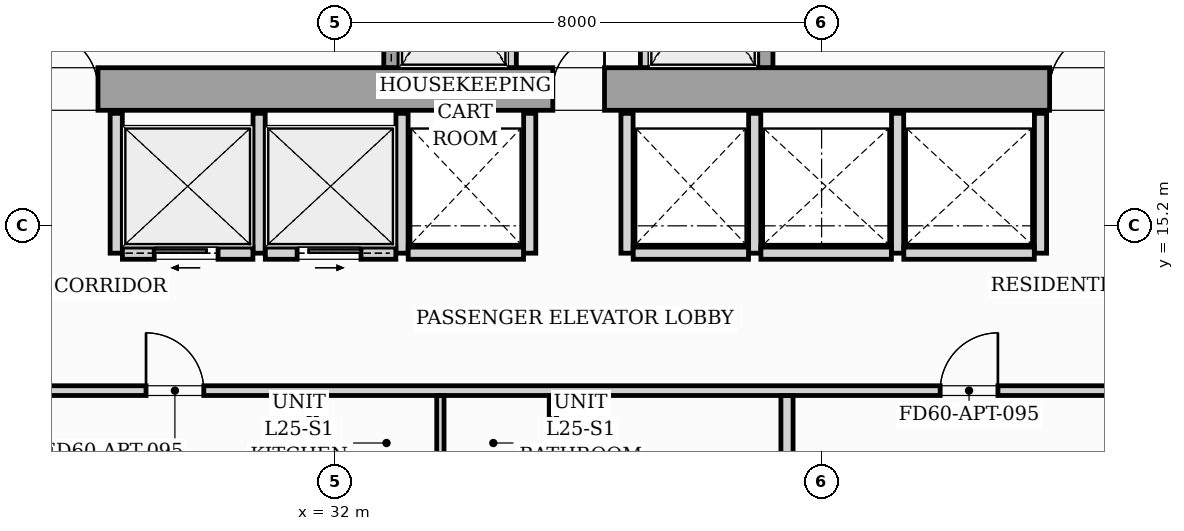
"""IFC4 building model, lengths in metres.
Left out: names, types, materials, properties, quantities, classifications, styles, units other than length and angle.
Written with IfcOpenShell. Run it as: python <this file> out.ifc"""

import sys

from ifc_helpers import new_model, si_unit, direction, frame, frame_2d, origin, origin_2d, place, context, subcontext, project, spatial, rectangle, i_section, extrude, source, transform, mapped, element, fill, save


model = new_model("IFC4")
c1 = context("Model", 3, precision=1e-05, world=origin(), true_north=direction((0.0, 1.0)))
c2 = subcontext(c1, "Body", "Model", "MODEL_VIEW")
j1 = project(units=[si_unit("LENGTHUNIT", "METRE"), si_unit("PLANEANGLEUNIT", "RADIAN")], contexts=[c1])
p1 = place(None, origin())
s1 = spatial("IfcSite", under=j1, at=p1, CompositionType="ELEMENT")
p2 = place(p1, origin())
s2 = spatial("IfcBuilding", under=s1, at=p2, CompositionType="ELEMENT")
p3 = place(p2, frame((0.0, 0.0, 90.6)))
s3 = spatial("IfcBuildingStorey", under=s2, at=p3, CompositionType="ELEMENT", Elevation=90.6)
m1 = source(origin(), c2, "Body", "SweptSolid", [
    extrude(i_section(OverallWidth=0.427, OverallDepth=0.483, WebThickness=0.051, FlangeThickness=0.082, FilletRadius=0.018, at=origin_2d()), origin(), (0.0, 0.0, 1.0), 3.196),
])
for number, where, z_axis, x_axis in (
    (1, (33.12, 17.4, 0.002), (0.0, 0.0, 1.0), (1.0, 0.0, 0.0)),
    (2, (38.88, 17.4, 0.002), (0.0, 0.0, 1.0), (1.0, 0.0, 0.0)),
):
    element("IfcColumn", number, at=place(p3, frame(where, z_axis=z_axis, x_axis=x_axis)), inside=s3, PredefinedType="PILASTER", context=c2, shape_type="MappedRepresentation", body=[
        mapped(m1, transform((0.0, 0.0, 0.0), scale=1.0)),
    ])
p4 = place(p3, frame((26.1, 17.45, 0.0), z_axis=(0.0, 0.0, 1.0), x_axis=(1.0, 0.0, 0.0)))
e3 = element("IfcWall", 3, at=p4, inside=s3, PredefinedType="SHEAR", context=c2, shape_type="SweptSolid", body=[
    extrude(rectangle(XDim=19.8, YDim=0.7, at=frame_2d((9.9, 0.0))), origin(), (0.0, 0.0, 1.0), 3.2),
])
p5 = place(p4, frame((1.05, 0.0, 0.0)))
e4 = element("IfcOpeningElement", 4, at=p5, cuts=e3, PredefinedType="OPENING", context=c2, shape_type="SweptSolid", body=[
    extrude(rectangle(XDim=0.95, YDim=2.06, at=frame_2d((0.475, 1.03))), frame((0.0, 0.36, 0.0), z_axis=(0.0, -1.0, 0.0), x_axis=(1.0, 0.0, 0.0)), (0.0, 0.0, 1.0), 0.72),
])
p6 = place(p4, frame((9.48, 0.0, 0.0)))
e5 = element("IfcOpeningElement", 5, at=p6, cuts=e3, PredefinedType="OPENING", context=c2, shape_type="SweptSolid", body=[
    extrude(rectangle(XDim=0.85, YDim=2.0, at=frame_2d((0.425, 1.0))), frame((0.0, 0.36, 0.0), z_axis=(0.0, -1.0, 0.0), x_axis=(1.0, 0.0, 0.0)), (0.0, 0.0, 1.0), 0.72),
])
p7 = place(p4, frame((17.65, 0.0, 0.0)))
e6 = element("IfcOpeningElement", 6, at=p7, cuts=e3, PredefinedType="OPENING", context=c2, shape_type="SweptSolid", body=[
    extrude(rectangle(XDim=0.95, YDim=2.06, at=frame_2d((0.475, 1.03))), frame((0.0, 0.36, 0.0), z_axis=(0.0, -1.0, 0.0), x_axis=(1.0, 0.0, 0.0)), (0.0, 0.0, 1.0), 0.72),
])
p8 = place(p3, frame((32.925, 17.802, 0.0), z_axis=(0.0, 0.0, 1.0), x_axis=(0.0, 1.0, 0.0)))
e7 = element("IfcWall", 7, at=p8, inside=s3, PredefinedType="SOLIDWALL", context=c2, shape_type="SweptSolid", body=[
    extrude(rectangle(XDim=2.646, YDim=0.25, at=frame_2d((1.323, 0.0))), origin(), (0.0, 0.0, 1.0), 3.2),
])
p9 = place(p8, frame((0.598, 0.0, 0.0)))
e8 = element("IfcOpeningElement", 8, at=p9, cuts=e7, PredefinedType="OPENING", context=c2, shape_type="SweptSolid", body=[
    extrude(rectangle(XDim=1.1, YDim=2.08, at=frame_2d((0.55, 1.04))), frame((0.0, 0.135, 0.0), z_axis=(0.0, -1.0, 0.0), x_axis=(1.0, 0.0, 0.0)), (0.0, 0.0, 1.0), 0.27),
])
for number, where, z_axis, x_axis in (
    (9, (34.9, 17.802, 0.0), (0.0, 0.0, 1.0), (0.0, 1.0, 0.0)),
    (10, (37.1, 17.802, 0.0), (0.0, 0.0, 1.0), (0.0, 1.0, 0.0)),
):
    element("IfcWall", number, at=place(p3, frame(where, z_axis=z_axis, x_axis=x_axis)), inside=s3, PredefinedType="PARTITIONING", context=c2, shape_type="SweptSolid", body=[
        extrude(rectangle(XDim=2.646, YDim=0.16, at=frame_2d((1.323, 0.0))), origin(), (0.0, 0.0, 1.0), 2.94),
    ])
p10 = place(p3, frame((39.075, 17.802, 0.0), z_axis=(0.0, 0.0, 1.0), x_axis=(0.0, 1.0, 0.0)))
e11 = element("IfcWall", 11, at=p10, inside=s3, PredefinedType="SOLIDWALL", context=c2, shape_type="SweptSolid", body=[
    extrude(rectangle(XDim=2.646, YDim=0.25, at=frame_2d((1.323, 0.0))), origin(), (0.0, 0.0, 1.0), 3.2),
])
p11 = place(p10, frame((0.598, 0.0, 0.0)))
e12 = element("IfcOpeningElement", 12, at=p11, cuts=e11, PredefinedType="OPENING", context=c2, shape_type="SweptSolid", body=[
    extrude(rectangle(XDim=1.1, YDim=2.08, at=frame_2d((0.55, 1.04))), frame((0.0, 0.135, 0.0), z_axis=(0.0, -1.0, 0.0), x_axis=(1.0, 0.0, 0.0)), (0.0, 0.0, 1.0), 0.27),
])
for number, where, z_axis, x_axis in (
    (13, (28.4, 14.75, 0.0), (0.0, 0.0, 1.0), (0.0, 1.0, 0.0)),
    (14, (30.75, 14.75, 0.0), (0.0, 0.0, 1.0), (0.0, 1.0, 0.0)),
    (15, (33.1, 14.75, 0.0), (0.0, 0.0, 1.0), (0.0, 1.0, 0.0)),
):
    element("IfcWall", number, at=place(p3, frame(where, z_axis=z_axis, x_axis=x_axis)), inside=s3, PredefinedType="PARTITIONING", context=c2, shape_type="SweptSolid", body=[
        extrude(rectangle(XDim=2.3, YDim=0.2, at=frame_2d((1.15, 0.0))), origin(), (0.0, 0.0, 1.0), 2.94),
    ])
p12 = place(p3, frame((28.502, 14.75, 0.0), z_axis=(0.0, 0.0, 1.0), x_axis=(1.0, 0.0, 0.0)))
e16 = element("IfcWall", 16, at=p12, inside=s3, PredefinedType="PARTITIONING", context=c2, shape_type="SweptSolid", body=[
    extrude(rectangle(XDim=2.146, YDim=0.2, at=frame_2d((1.073, 0.0))), origin(), (0.0, 0.0, 1.0), 2.94),
])
p13 = place(p12, frame((0.523, 0.0, 0.0)))
e17 = element("IfcOpeningElement", 17, at=p13, cuts=e16, PredefinedType="OPENING", context=c2, shape_type="SweptSolid", body=[
    extrude(rectangle(XDim=1.05, YDim=2.08, at=frame_2d((0.525, 1.04))), frame((0.0, 0.11, 0.0), z_axis=(0.0, -1.0, 0.0), x_axis=(1.0, 0.0, 0.0)), (0.0, 0.0, 1.0), 0.22),
])
p14 = place(p3, frame((30.852, 14.75, 0.0), z_axis=(0.0, 0.0, 1.0), x_axis=(1.0, 0.0, 0.0)))
e18 = element("IfcWall", 18, at=p14, inside=s3, PredefinedType="PARTITIONING", context=c2, shape_type="SweptSolid", body=[
    extrude(rectangle(XDim=2.146, YDim=0.2, at=frame_2d((1.073, 0.0))), origin(), (0.0, 0.0, 1.0), 2.94),
])
p15 = place(p14, frame((0.523, 0.0, 0.0)))
e19 = element("IfcOpeningElement", 19, at=p15, cuts=e18, PredefinedType="OPENING", context=c2, shape_type="SweptSolid", body=[
    extrude(rectangle(XDim=1.05, YDim=2.08, at=frame_2d((0.525, 1.04))), frame((0.0, 0.11, 0.0), z_axis=(0.0, -1.0, 0.0), x_axis=(1.0, 0.0, 0.0)), (0.0, 0.0, 1.0), 0.22),
])
p16 = place(p3, frame((35.2, 14.75, 0.0), z_axis=(0.0, 0.0, 1.0), x_axis=(0.0, 1.0, 0.0)))
e20 = element("IfcWall", 20, at=p16, inside=s3, PredefinedType="PARTITIONING", context=c2, shape_type="SweptSolid", body=[
    extrude(rectangle(XDim=2.3, YDim=0.2, at=frame_2d((1.15, 0.0))), origin(), (0.0, 0.0, 1.0), 2.94),
])
p17 = place(p3, frame((33.202, 14.75, 0.0), z_axis=(0.0, 0.0, 1.0), x_axis=(1.0, 0.0, 0.0)))
e21 = element("IfcWall", 21, at=p17, inside=s3, PredefinedType="PARTITIONING", context=c2, shape_type="SweptSolid", body=[
    extrude(rectangle(XDim=1.896, YDim=0.2, at=frame_2d((0.948, 0.0))), origin(), (0.0, 0.0, 1.0), 2.94),
])
for number, where, z_axis, x_axis in (
    (22, (36.8, 14.75, 0.0), (0.0, 0.0, 1.0), (0.0, 1.0, 0.0)),
    (23, (38.9, 14.75, 0.0), (0.0, 0.0, 1.0), (0.0, 1.0, 0.0)),
):
    element("IfcWall", number, at=place(p3, frame(where, z_axis=z_axis, x_axis=x_axis)), inside=s3, PredefinedType="PARTITIONING", context=c2, shape_type="SweptSolid", body=[
        extrude(rectangle(XDim=2.3, YDim=0.2, at=frame_2d((1.15, 0.0))), origin(), (0.0, 0.0, 1.0), 2.94),
    ])
p18 = place(p3, frame((36.902, 14.75, 0.0), z_axis=(0.0, 0.0, 1.0), x_axis=(1.0, 0.0, 0.0)))
e24 = element("IfcWall", 24, at=p18, inside=s3, PredefinedType="PARTITIONING", context=c2, shape_type="SweptSolid", body=[
    extrude(rectangle(XDim=1.896, YDim=0.2, at=frame_2d((0.948, 0.0))), origin(), (0.0, 0.0, 1.0), 2.94),
])
for number, where, z_axis, x_axis in (
    (25, (41.25, 14.75, 0.0), (0.0, 0.0, 1.0), (0.0, 1.0, 0.0)),
    (26, (43.6, 14.75, 0.0), (0.0, 0.0, 1.0), (0.0, 1.0, 0.0)),
):
    element("IfcWall", number, at=place(p3, frame(where, z_axis=z_axis, x_axis=x_axis)), inside=s3, PredefinedType="PARTITIONING", context=c2, shape_type="SweptSolid", body=[
        extrude(rectangle(XDim=2.3, YDim=0.2, at=frame_2d((1.15, 0.0))), origin(), (0.0, 0.0, 1.0), 2.94),
    ])
for number, where, z_axis, x_axis in (
    (27, (39.002, 14.75, 0.0), (0.0, 0.0, 1.0), (1.0, 0.0, 0.0)),
    (28, (41.352, 14.75, 0.0), (0.0, 0.0, 1.0), (1.0, 0.0, 0.0)),
):
    element("IfcWall", number, at=place(p3, frame(where, z_axis=z_axis, x_axis=x_axis)), inside=s3, PredefinedType="PARTITIONING", context=c2, shape_type="SweptSolid", body=[
        extrude(rectangle(XDim=2.146, YDim=0.2, at=frame_2d((1.073, 0.0))), origin(), (0.0, 0.0, 1.0), 2.94),
    ])
p19 = place(p3, frame((17.7, 12.49, 0.0), z_axis=(0.0, 0.0, 1.0), x_axis=(1.0, 0.0, 0.0)))
e29 = element("IfcWall", 29, at=p19, inside=s3, PredefinedType="PARTITIONING", context=c2, shape_type="SweptSolid", body=[
    extrude(rectangle(XDim=35.4, YDim=0.16, at=frame_2d((17.7, 0.0))), origin(), (0.0, 0.0, 1.0), 2.94),
])
p20 = place(p19, frame((11.19, 0.0, 0.0)))
e30 = element("IfcOpeningElement", 30, at=p20, cuts=e29, PredefinedType="OPENING", context=c2, shape_type="SweptSolid", body=[
    extrude(rectangle(XDim=0.95, YDim=2.06, at=frame_2d((0.475, 1.03))), frame((0.0, 0.09, 0.0), z_axis=(0.0, -1.0, 0.0), x_axis=(1.0, 0.0, 0.0)), (0.0, 0.0, 1.0), 0.18),
])
p21 = place(p19, frame((24.25, 0.0, 0.0)))
e31 = element("IfcOpeningElement", 31, at=p21, cuts=e29, PredefinedType="OPENING", context=c2, shape_type="SweptSolid", body=[
    extrude(rectangle(XDim=0.95, YDim=2.06, at=frame_2d((0.475, 1.03))), frame((0.0, 0.09, 0.0), z_axis=(0.0, -1.0, 0.0), x_axis=(1.0, 0.0, 0.0)), (0.0, 0.0, 1.0), 0.18),
])
p22 = place(p3, frame((35.581, 5.986, 0.0), z_axis=(0.0, 0.0, 1.0), x_axis=(0.0, 1.0, 0.0)))
e32 = element("IfcWall", 32, at=p22, inside=s3, PredefinedType="PARTITIONING", context=c2, shape_type="SweptSolid", body=[
    extrude(rectangle(XDim=6.422, YDim=0.12, at=frame_2d((3.211, 0.0))), origin(), (0.0, 0.0, 1.0), 2.94),
])
p23 = place(p22, frame((3.154, 0.0, 0.0)))
e33 = element("IfcOpeningElement", 33, at=p23, cuts=e32, PredefinedType="OPENING", context=c2, shape_type="SweptSolid", body=[
    extrude(rectangle(XDim=0.9, YDim=2.05, at=frame_2d((0.45, 1.025))), frame((0.0, 0.07, 0.0), z_axis=(0.0, -1.0, 0.0), x_axis=(1.0, 0.0, 0.0)), (0.0, 0.0, 1.0), 0.14),
])
for number, where, z_axis, x_axis in (
    (34, (33.731, 10.302, 0.0), (0.0, 0.0, 1.0), (0.0, 1.0, 0.0)),
    (35, (31.631, 10.302, 0.0), (0.0, 0.0, 1.0), (0.0, 1.0, 0.0)),
):
    element("IfcWall", number, at=place(p3, frame(where, z_axis=z_axis, x_axis=x_axis)), inside=s3, PredefinedType="PARTITIONING", context=c2, shape_type="SweptSolid", body=[
        extrude(rectangle(XDim=2.106, YDim=0.12, at=frame_2d((1.053, 0.0))), origin(), (0.0, 0.0, 1.0), 2.94),
    ])
p24 = place(p3, frame((39.431, 6.356, 0.0), z_axis=(0.0, 0.0, 1.0), x_axis=(0.0, 1.0, 0.0)))
e36 = element("IfcWall", 36, at=p24, inside=s3, PredefinedType="PARTITIONING", context=c2, shape_type="SweptSolid", body=[
    extrude(rectangle(XDim=6.052, YDim=0.2, at=frame_2d((3.026, 0.0))), origin(), (0.0, 0.0, 1.0), 2.94),
])
m2 = source(origin(), c2, "Body", "SweptSolid", [
    extrude(rectangle(XDim=0.95, YDim=2.06, at=frame_2d((0.475, 1.03))), frame((0.0, 0.025, 0.0), z_axis=(0.0, -1.0, 0.0), x_axis=(1.0, 0.0, 0.0)), (0.0, 0.0, 1.0), 0.05),
])
p25 = place(p5, origin())
e37 = element("IfcDoor", 37, at=p25, inside=s3, OperationType="SINGLE_SWING_LEFT", PredefinedType="DOOR", context=c2, shape_type="MappedRepresentation", body=[
    mapped(m2, transform((0.0, 0.0, 0.0), scale=1.0)),
])
fill(e4, e37)
m3 = source(origin(), c2, "Body", "SweptSolid", [
    extrude(rectangle(XDim=0.85, YDim=2.0, at=frame_2d((0.425, 1.0))), frame((0.0, 0.025, 0.0), z_axis=(0.0, -1.0, 0.0), x_axis=(1.0, 0.0, 0.0)), (0.0, 0.0, 1.0), 0.05),
])
p26 = place(p6, origin())
e38 = element("IfcDoor", 38, at=p26, inside=s3, OperationType="SINGLE_SWING_RIGHT", PredefinedType="DOOR", context=c2, shape_type="MappedRepresentation", body=[
    mapped(m3, transform((0.0, 0.0, 0.0), scale=1.0)),
])
fill(e5, e38)
p27 = place(p7, origin())
e39 = element("IfcDoor", 39, at=p27, inside=s3, OperationType="SINGLE_SWING_RIGHT", PredefinedType="DOOR", context=c2, shape_type="MappedRepresentation", body=[
    mapped(m2, transform((0.0, 0.0, 0.0), scale=1.0)),
])
fill(e6, e39)
m4 = source(origin(), c2, "Body", "SweptSolid", [
    extrude(rectangle(XDim=1.05, YDim=2.08, at=frame_2d((0.525, 1.04))), frame((0.0, 0.025, 0.0), z_axis=(0.0, -1.0, 0.0), x_axis=(1.0, 0.0, 0.0)), (0.0, 0.0, 1.0), 0.05),
])
p28 = place(p13, origin())
e40 = element("IfcDoor", 40, at=p28, inside=s3, OperationType="SLIDING_TO_LEFT", PredefinedType="DOOR", context=c2, shape_type="MappedRepresentation", body=[
    mapped(m4, transform((0.0, 0.0, 0.0), scale=1.0)),
])
fill(e17, e40)
p29 = place(p15, origin())
e41 = element("IfcDoor", 41, at=p29, inside=s3, OperationType="SLIDING_TO_RIGHT", PredefinedType="DOOR", context=c2, shape_type="MappedRepresentation", body=[
    mapped(m4, transform((0.0, 0.0, 0.0), scale=1.0)),
])
fill(e19, e41)
m5 = source(origin(), c2, "Body", "SweptSolid", [
    extrude(rectangle(XDim=0.95, YDim=2.06, at=frame_2d((0.475, 1.03))), frame((0.0, 0.025, 0.0), z_axis=(0.0, -1.0, 0.0), x_axis=(1.0, 0.0, 0.0)), (0.0, 0.0, 1.0), 0.05),
])
p30 = place(p20, origin())
e42 = element("IfcDoor", 42, at=p30, inside=s3, OperationType="SINGLE_SWING_LEFT", PredefinedType="DOOR", context=c2, shape_type="MappedRepresentation", body=[
    mapped(m5, transform((0.0, 0.0, 0.0), scale=1.0)),
])
fill(e30, e42)
p31 = place(p21, origin())
e43 = element("IfcDoor", 43, at=p31, inside=s3, OperationType="SINGLE_SWING_RIGHT", PredefinedType="DOOR", context=c2, shape_type="MappedRepresentation", body=[
    mapped(m5, transform((0.0, 0.0, 0.0), scale=1.0)),
])
fill(e31, e43)
save(model, sys.argv[1])
